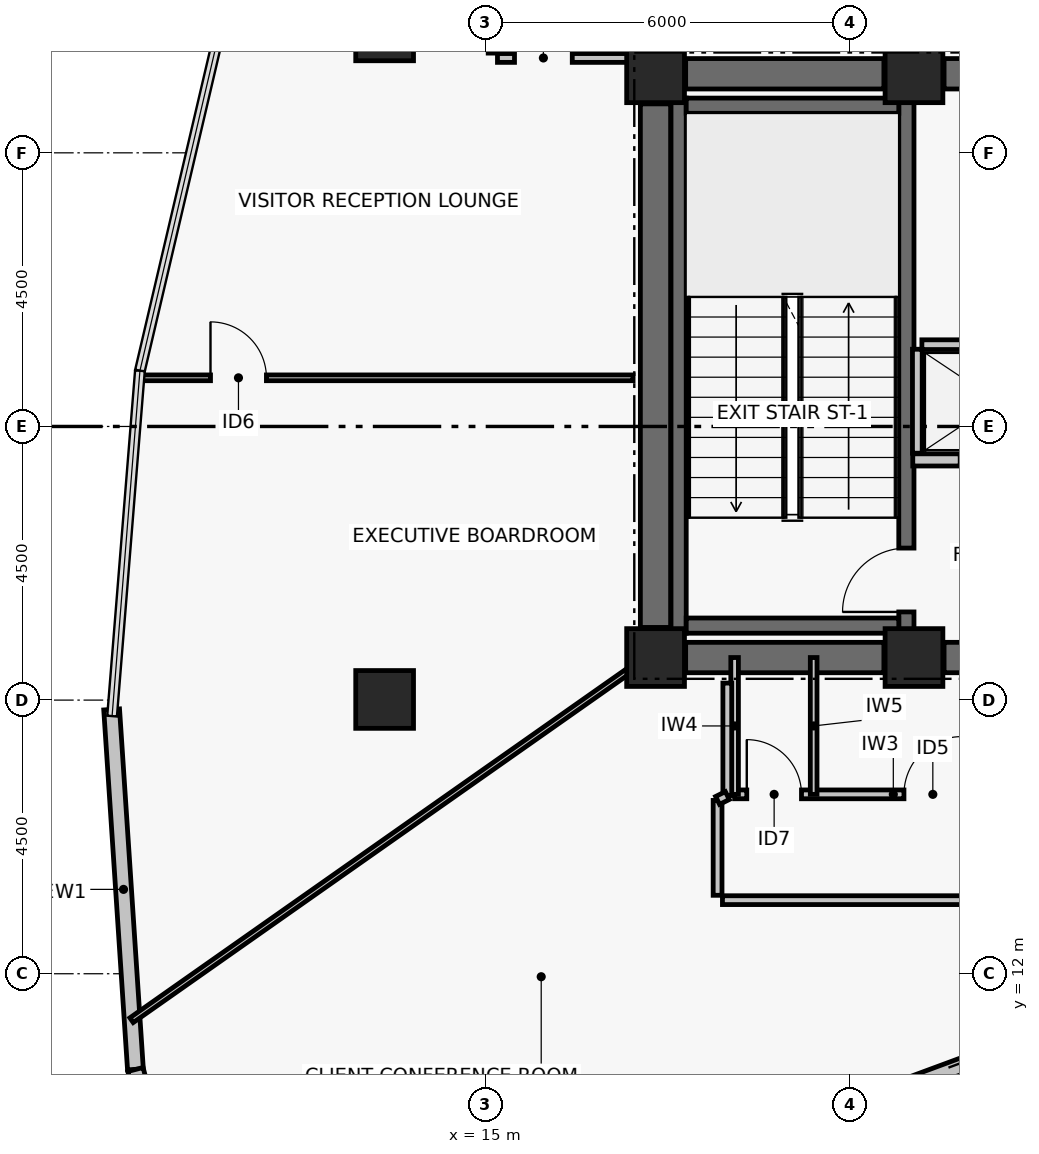
"""IFC4 building model, lengths in metres.
Left out: names, types, materials, properties, quantities, classifications, styles, units other than length and angle.
Written with IfcOpenShell. Run it as: python <this file> out.ifc"""

import sys

from ifc_helpers import new_model, si_unit, direction, frame, frame_2d, origin, origin_2d, place, context, subcontext, project, spatial, rectangle, hollow_rectangle, extrude, element, fill, save


model = new_model("IFC4")
c1 = context("Model", 3, precision=1e-05, world=origin(), true_north=direction((0.0, 1.0)))
c2 = subcontext(c1, "Body", "Model", "MODEL_VIEW")
j1 = project(units=[si_unit("LENGTHUNIT", "METRE"), si_unit("PLANEANGLEUNIT", "RADIAN")], contexts=[c1])
p1 = place(None, origin())
s1 = spatial("IfcSite", under=j1, at=p1, CompositionType="ELEMENT")
p2 = place(p1, origin())
s2 = spatial("IfcBuilding", under=s1, at=p2, CompositionType="ELEMENT")
p3 = place(p2, frame((0.0, 0.0, 172.92)))
s3 = spatial("IfcBuildingStorey", under=s2, at=p3, CompositionType="ELEMENT", Elevation=172.92)
for number, where, z_axis, x_axis in (
    (1, (17.8, 17.2, 0.0), (0.0, 0.0, 1.0), (1.0, 0.0, 0.0)),
    (2, (22.05, 17.2, 0.0), (0.0, 0.0, 1.0), (1.0, 0.0, 0.0)),
    (3, (17.8, 26.8, 0.0), (0.0, 0.0, 1.0), (1.0, 0.0, 0.0)),
    (4, (22.05, 26.8, 0.0), (0.0, 0.0, 1.0), (1.0, 0.0, 0.0)),
):
    element("IfcColumn", number, at=place(p3, frame(where, z_axis=z_axis, x_axis=x_axis)), inside=s3, PredefinedType="COLUMN", context=c2, shape_type="SweptSolid", body=[
        extrude(rectangle(XDim=0.95, YDim=0.95, at=origin_2d()), origin(), (0.0, 0.0, 1.0), 3.72),
    ])
p4 = place(p3, frame((18.295, 17.2, 0.0), z_axis=(0.0, 0.0, 1.0), x_axis=(1.0, 0.0, 0.0)))
e5 = element("IfcWall", 5, at=p4, inside=s3, PredefinedType="SHEAR", context=c2, shape_type="SweptSolid", body=[
    extrude(rectangle(XDim=3.26, YDim=0.5, at=frame_2d((1.63, 0.0))), origin(), (0.0, 0.0, 1.0), 3.5),
])
p5 = place(p3, frame((22.545, 17.2, 0.0), z_axis=(0.0, 0.0, 1.0), x_axis=(1.0, 0.0, 0.0)))
e6 = element("IfcWall", 6, at=p5, inside=s3, PredefinedType="SHEAR", context=c2, shape_type="SweptSolid", body=[
    extrude(rectangle(XDim=1.805, YDim=0.5, at=frame_2d((0.903, 0.0))), origin(), (0.0, 0.0, 1.0), 3.5),
])
p6 = place(p3, frame((18.295, 26.8, 0.0), z_axis=(0.0, 0.0, 1.0), x_axis=(1.0, 0.0, 0.0)))
e7 = element("IfcWall", 7, at=p6, inside=s3, PredefinedType="SHEAR", context=c2, shape_type="SweptSolid", body=[
    extrude(rectangle(XDim=3.26, YDim=0.5, at=frame_2d((1.63, 0.0))), origin(), (0.0, 0.0, 1.0), 3.5),
])
p7 = place(p3, frame((22.545, 26.8, 0.0), z_axis=(0.0, 0.0, 1.0), x_axis=(1.0, 0.0, 0.0)))
e8 = element("IfcWall", 8, at=p7, inside=s3, PredefinedType="SHEAR", context=c2, shape_type="SweptSolid", body=[
    extrude(rectangle(XDim=1.805, YDim=0.5, at=frame_2d((0.903, 0.0))), origin(), (0.0, 0.0, 1.0), 3.5),
])
p8 = place(p3, frame((17.8, 17.695, 0.0), z_axis=(0.0, 0.0, 1.0), x_axis=(0.0, 1.0, 0.0)))
e9 = element("IfcWall", 9, at=p8, inside=s3, PredefinedType="SHEAR", context=c2, shape_type="SweptSolid", body=[
    extrude(rectangle(XDim=8.61, YDim=0.5, at=frame_2d((4.305, 0.0))), origin(), (0.0, 0.0, 1.0), 3.5),
])
p9 = place(p3, frame((18.179, 17.6, 0.0), z_axis=(0.0, 0.0, 1.0), x_axis=(0.0, 1.0, 0.0)))
e10 = element("IfcWall", 10, at=p9, inside=s3, PredefinedType="SHEAR", context=c2, shape_type="SweptSolid", body=[
    extrude(rectangle(XDim=8.8, YDim=0.25, at=frame_2d((4.4, 0.0))), origin(), (0.0, 0.0, 1.0), 3.5),
])
p10 = place(p3, frame((21.925, 17.6, 0.0), z_axis=(0.0, 0.0, 1.0), x_axis=(0.0, 1.0, 0.0)))
e11 = element("IfcWall", 11, at=p10, inside=s3, PredefinedType="SHEAR", context=c2, shape_type="SweptSolid", body=[
    extrude(rectangle(XDim=8.8, YDim=0.25, at=frame_2d((4.4, 0.0))), origin(), (0.0, 0.0, 1.0), 3.5),
])
p11 = place(p10, frame((0.35, 0.0, 0.0)))
e12 = element("IfcOpeningElement", 12, at=p11, cuts=e11, PredefinedType="OPENING", context=c2, shape_type="SweptSolid", body=[
    extrude(rectangle(XDim=1.05, YDim=2.08, at=frame_2d((0.525, 1.04))), frame((0.0, 0.135, 0.0), z_axis=(0.0, -1.0, 0.0), x_axis=(1.0, 0.0, 0.0)), (0.0, 0.0, 1.0), 0.27),
])
for number, where, z_axis, x_axis in (
    (13, (18.304, 17.725, 0.0), (0.0, 0.0, 1.0), (1.0, 0.0, 0.0)),
    (14, (18.304, 26.275, 0.0), (0.0, 0.0, 1.0), (1.0, 0.0, 0.0)),
):
    element("IfcWall", number, at=place(p3, frame(where, z_axis=z_axis, x_axis=x_axis)), inside=s3, PredefinedType="SHEAR", context=c2, shape_type="SweptSolid", body=[
        extrude(rectangle(XDim=3.496, YDim=0.25, at=frame_2d((1.748, 0.0))), origin(), (0.0, 0.0, 1.0), 3.5),
    ])
for number, where, z_axis, x_axis in (
    (15, (13.344, 27.489, 0.0), (0.0, 0.0, 1.0), (1.0, 0.0, 0.0)),
    (16, (13.344, 16.511, 0.0), (0.0, 0.0, 1.0), (1.0, 0.0, 0.0)),
):
    element("IfcColumn", number, at=place(p3, frame(where, z_axis=z_axis, x_axis=x_axis)), inside=s3, PredefinedType="COLUMN", context=c2, shape_type="SweptSolid", body=[
        extrude(hollow_rectangle(XDim=0.95, YDim=0.95, WallThickness=0.04, at=origin_2d()), origin(), (0.0, 0.0, 1.0), 3.72),
    ])
p12 = place(p3, frame((9.246, 10.428, 0.0), z_axis=(0.0, 0.0, 1.0), x_axis=(-0.065934416021, 0.997823958814, 0.0)))
e17 = element("IfcWall", 17, at=p12, inside=s3, PredefinedType="PARTITIONING", context=c2, shape_type="SweptSolid", body=[
    extrude(rectangle(XDim=5.932, YDim=0.26, at=frame_2d((2.966, 0.0))), origin(), (0.0, 0.0, 1.0), 3.5),
])
p13 = place(p3, frame((9.963, 7.669, 0.0), z_axis=(0.0, 0.0, 1.0), x_axis=(-0.251601733001, 0.967830857098, 0.0)))
e18 = element("IfcWall", 18, at=p13, inside=s3, PredefinedType="PARTITIONING", context=c2, shape_type="SweptSolid", body=[
    extrude(rectangle(XDim=2.848, YDim=0.26, at=frame_2d((1.424, 0.0))), origin(), (0.0, 0.0, 1.0), 3.5),
])
p14 = place(p3, frame((23.495, 10.727, 0.0), z_axis=(0.0, 0.0, 1.0), x_axis=(-0.937882421791, -0.346953257508, 0.0)))
e19 = element("IfcWall", 19, at=p14, inside=s3, PredefinedType="PARTITIONING", context=c2, shape_type="SweptSolid", body=[
    extrude(rectangle(XDim=3.127, YDim=0.26, at=frame_2d((1.563, 0.0))), origin(), (0.0, 0.0, 1.0), 3.5),
])
p15 = place(p3, frame((22.03, 20.45, 0.0), z_axis=(0.0, 0.0, 1.0), x_axis=(1.0, 0.0, 0.0)))
e20 = element("IfcWall", 20, at=p15, inside=s3, PredefinedType="PARTITIONING", context=c2, shape_type="SweptSolid", body=[
    extrude(rectangle(XDim=2.8, YDim=0.2, at=frame_2d((1.4, 0.0))), origin(), (0.0, 0.0, 1.0), 3.5),
])
p16 = place(p15, frame((0.78, 0.0, 0.0)))
e21 = element("IfcOpeningElement", 21, at=p16, cuts=e20, PredefinedType="OPENING", context=c2, shape_type="SweptSolid", body=[
    extrude(rectangle(XDim=1.1, YDim=2.08, at=frame_2d((0.55, 1.04))), frame((0.0, 0.11, 0.0), z_axis=(0.0, -1.0, 0.0), x_axis=(1.0, 0.0, 0.0)), (0.0, 0.0, 1.0), 0.22),
])
p17 = place(p3, frame((22.105, 20.56, 0.0), z_axis=(0.0, 0.0, 1.0), x_axis=(0.0, 1.0, 0.0)))
e22 = element("IfcWall", 22, at=p17, inside=s3, PredefinedType="PARTITIONING", context=c2, shape_type="SweptSolid", body=[
    extrude(rectangle(XDim=1.71, YDim=0.16, at=frame_2d((0.855, 0.0))), origin(), (0.0, 0.0, 1.0), 3.5),
])
p18 = place(p3, frame((22.18, 22.345, 0.0), z_axis=(0.0, 0.0, 1.0), x_axis=(1.0, 0.0, 0.0)))
e23 = element("IfcWall", 23, at=p18, inside=s3, PredefinedType="PARTITIONING", context=c2, shape_type="SweptSolid", body=[
    extrude(rectangle(XDim=2.65, YDim=0.16, at=frame_2d((1.325, 0.0))), origin(), (0.0, 0.0, 1.0), 3.5),
])
p19 = place(p3, frame((19.1, 14.95, 0.0), z_axis=(0.0, 0.0, 1.0), x_axis=(1.0, 0.0, 0.0)))
e24 = element("IfcWall", 24, at=p19, inside=s3, PredefinedType="PARTITIONING", context=c2, shape_type="SweptSolid", body=[
    extrude(rectangle(XDim=5.22, YDim=0.145, at=frame_2d((2.61, 0.0))), origin(), (0.0, 0.0, 1.0), 2.73),
])
p20 = place(p19, frame((0.2, 0.0, 0.0)))
e25 = element("IfcOpeningElement", 25, at=p20, cuts=e24, PredefinedType="OPENING", context=c2, shape_type="SweptSolid", body=[
    extrude(rectangle(XDim=0.9, YDim=2.02, at=frame_2d((0.45, 1.01))), frame((0.0, 0.083, 0.0), z_axis=(0.0, -1.0, 0.0), x_axis=(1.0, 0.0, 0.0)), (0.0, 0.0, 1.0), 0.165),
])
p21 = place(p19, frame((2.785, 0.0, 0.0)))
e26 = element("IfcOpeningElement", 26, at=p21, cuts=e24, PredefinedType="OPENING", context=c2, shape_type="SweptSolid", body=[
    extrude(rectangle(XDim=0.95, YDim=2.06, at=frame_2d((0.475, 1.03))), frame((0.0, 0.083, 0.0), z_axis=(0.0, -1.0, 0.0), x_axis=(1.0, 0.0, 0.0)), (0.0, 0.0, 1.0), 0.165),
])
p22 = place(p3, frame((19.1, 14.95, 0.0), z_axis=(0.0, 0.0, 1.0), x_axis=(0.0, 1.0, 0.0)))
e27 = element("IfcWall", 27, at=p22, inside=s3, PredefinedType="PARTITIONING", context=c2, shape_type="SweptSolid", body=[
    extrude(rectangle(XDim=2.25, YDim=0.125, at=frame_2d((1.125, 0.0))), origin(), (0.0, 0.0, 1.0), 2.63),
])
p23 = place(p3, frame((20.4, 14.95, 0.0), z_axis=(0.0, 0.0, 1.0), x_axis=(0.0, 1.0, 0.0)))
e28 = element("IfcWall", 28, at=p23, inside=s3, PredefinedType="PARTITIONING", context=c2, shape_type="SweptSolid", body=[
    extrude(rectangle(XDim=2.25, YDim=0.11, at=frame_2d((1.125, 0.0))), origin(), (0.0, 0.0, 1.0), 2.63),
])
p24 = place(p3, frame((18.98, 16.78, 0.0), z_axis=(0.0, 0.0, 1.0), x_axis=(0.0, -1.0, 0.0)))
e29 = element("IfcWall", 29, at=p24, inside=s3, PredefinedType="PARTITIONING", context=c2, shape_type="SweptSolid", body=[
    extrude(rectangle(XDim=1.85, YDim=0.145, at=frame_2d((0.925, 0.0))), origin(), (0.0, 0.0, 1.0), 2.63),
])
p25 = place(p3, frame((18.82, 14.85, 0.0), z_axis=(0.0, 0.0, 1.0), x_axis=(0.0, -1.0, 0.0)))
e30 = element("IfcWall", 30, at=p25, inside=s3, PredefinedType="PARTITIONING", context=c2, shape_type="SweptSolid", body=[
    extrude(rectangle(XDim=1.56, YDim=0.145, at=frame_2d((0.78, 0.0))), origin(), (0.0, 0.0, 1.0), 3.08),
])
p26 = place(p3, frame((18.9, 13.21, 0.0), z_axis=(0.0, 0.0, 1.0), x_axis=(1.0, 0.0, 0.0)))
e31 = element("IfcWall", 31, at=p26, inside=s3, PredefinedType="PARTITIONING", context=c2, shape_type="SweptSolid", body=[
    extrude(rectangle(XDim=9.479, YDim=0.145, at=frame_2d((4.74, 0.0))), origin(), (0.0, 0.0, 1.0), 2.73),
])
p27 = place(p26, frame((8.279, 0.0, 0.0)))
e32 = element("IfcOpeningElement", 32, at=p27, cuts=e31, PredefinedType="OPENING", context=c2, shape_type="SweptSolid", body=[
    extrude(rectangle(XDim=0.92, YDim=2.05, at=frame_2d((0.46, 1.025))), frame((0.0, 0.083, 0.0), z_axis=(0.0, -1.0, 0.0), x_axis=(1.0, 0.0, 0.0)), (0.0, 0.0, 1.0), 0.165),
])
p28 = place(p3, frame((15.12, 28.506, 0.0), z_axis=(0.0, 0.0, 1.0), x_axis=(0.0, -1.0, 0.0)))
e33 = element("IfcWall", 33, at=p28, inside=s3, PredefinedType="PARTITIONING", context=c2, shape_type="SweptSolid", body=[
    extrude(rectangle(XDim=1.366, YDim=0.145, at=frame_2d((0.683, 0.0))), origin(), (0.0, 0.0, 1.0), 2.73),
])
p29 = place(p3, frame((15.2, 27.06, 0.0), z_axis=(0.0, 0.0, 1.0), x_axis=(1.0, 0.0, 0.0)))
e34 = element("IfcWall", 34, at=p29, inside=s3, PredefinedType="PARTITIONING", context=c2, shape_type="SweptSolid", body=[
    extrude(rectangle(XDim=2.18, YDim=0.145, at=frame_2d((1.09, 0.0))), origin(), (0.0, 0.0, 1.0), 2.73),
])
p30 = place(p29, frame((0.28, 0.0, 0.0)))
e35 = element("IfcOpeningElement", 35, at=p30, cuts=e34, PredefinedType="OPENING", context=c2, shape_type="SweptSolid", body=[
    extrude(rectangle(XDim=0.95, YDim=2.06, at=frame_2d((0.475, 1.03))), frame((0.0, 0.083, 0.0), z_axis=(0.0, -1.0, 0.0), x_axis=(1.0, 0.0, 0.0)), (0.0, 0.0, 1.0), 0.165),
])
p31 = place(p3, frame((9.3, 21.8, 0.0), z_axis=(0.0, 0.0, 1.0), x_axis=(1.0, 0.0, 0.0)))
e36 = element("IfcWall", 36, at=p31, inside=s3, PredefinedType="PARTITIONING", context=c2, shape_type="SweptSolid", body=[
    extrude(rectangle(XDim=8.13, YDim=0.095, at=frame_2d((4.065, 0.0))), origin(), (0.0, 0.0, 1.0), 2.63),
])
p32 = place(p31, frame((1.18, 0.0, 0.0)))
e37 = element("IfcOpeningElement", 37, at=p32, cuts=e36, PredefinedType="OPENING", context=c2, shape_type="SweptSolid", body=[
    extrude(rectangle(XDim=0.92, YDim=2.05, at=frame_2d((0.46, 1.025))), frame((0.0, 0.057, 0.0), z_axis=(0.0, -1.0, 0.0), x_axis=(1.0, 0.0, 0.0)), (0.0, 0.0, 1.0), 0.115),
])
p33 = place(p3, frame((9.182, 11.236, 0.0), z_axis=(0.0, 0.0, 1.0), x_axis=(0.818184922636, 0.574955156835, 0.0)))
e38 = element("IfcWall", 38, at=p33, inside=s3, PredefinedType="PARTITIONING", context=c2, shape_type="SweptSolid", body=[
    extrude(rectangle(XDim=10.081, YDim=0.095, at=frame_2d((5.04, 0.0))), origin(), (0.0, 0.0, 1.0), 2.63),
])
p34 = place(p3, frame((18.82, 14.85, 0.0), z_axis=(0.0, 0.0, 1.0), x_axis=(0.89470021502, 0.446667130247, 0.0)))
e39 = element("IfcWall", 39, at=p34, inside=s3, PredefinedType="PARTITIONING", context=c2, shape_type="SweptSolid", body=[
    extrude(rectangle(XDim=0.179, YDim=0.145, at=frame_2d((0.089, 0.0))), origin(), (0.0, 0.0, 1.0), 3.5),
])
p35 = place(p11, origin())
e40 = element("IfcDoor", 40, at=p35, inside=s3, OperationType="SINGLE_SWING_LEFT", PredefinedType="DOOR", context=c2, shape_type="SweptSolid", body=[
    extrude(rectangle(XDim=1.05, YDim=2.08, at=frame_2d((0.525, 1.04))), frame((0.0, 0.025, 0.0), z_axis=(0.0, -1.0, 0.0), x_axis=(1.0, 0.0, 0.0)), (0.0, 0.0, 1.0), 0.05),
])
fill(e12, e40)
p36 = place(p20, origin())
e41 = element("IfcDoor", 41, at=p36, inside=s3, OperationType="SINGLE_SWING_LEFT", PredefinedType="DOOR", context=c2, shape_type="SweptSolid", body=[
    extrude(rectangle(XDim=0.9, YDim=2.02, at=frame_2d((0.45, 1.01))), frame((0.0, 0.025, 0.0), z_axis=(0.0, -1.0, 0.0), x_axis=(1.0, 0.0, 0.0)), (0.0, 0.0, 1.0), 0.05),
])
fill(e25, e41)
p37 = place(p21, origin())
e42 = element("IfcDoor", 42, at=p37, inside=s3, OperationType="SINGLE_SWING_RIGHT", PredefinedType="DOOR", context=c2, shape_type="SweptSolid", body=[
    extrude(rectangle(XDim=0.95, YDim=2.06, at=frame_2d((0.475, 1.03))), frame((0.0, 0.025, 0.0), z_axis=(0.0, -1.0, 0.0), x_axis=(1.0, 0.0, 0.0)), (0.0, 0.0, 1.0), 0.05),
])
fill(e26, e42)
p38 = place(p30, origin())
e43 = element("IfcDoor", 43, at=p38, inside=s3, OperationType="SINGLE_SWING_RIGHT", PredefinedType="DOOR", context=c2, shape_type="SweptSolid", body=[
    extrude(rectangle(XDim=0.95, YDim=2.06, at=frame_2d((0.475, 1.03))), frame((0.0, 0.025, 0.0), z_axis=(0.0, -1.0, 0.0), x_axis=(1.0, 0.0, 0.0)), (0.0, 0.0, 1.0), 0.05),
])
fill(e35, e43)
p39 = place(p32, origin())
e44 = element("IfcDoor", 44, at=p39, inside=s3, OperationType="SINGLE_SWING_LEFT", PredefinedType="DOOR", context=c2, shape_type="SweptSolid", body=[
    extrude(rectangle(XDim=0.92, YDim=2.05, at=frame_2d((0.46, 1.025))), frame((0.0, 0.025, 0.0), z_axis=(0.0, -1.0, 0.0), x_axis=(1.0, 0.0, 0.0)), (0.0, 0.0, 1.0), 0.05),
])
fill(e37, e44)
save(model, sys.argv[1])
